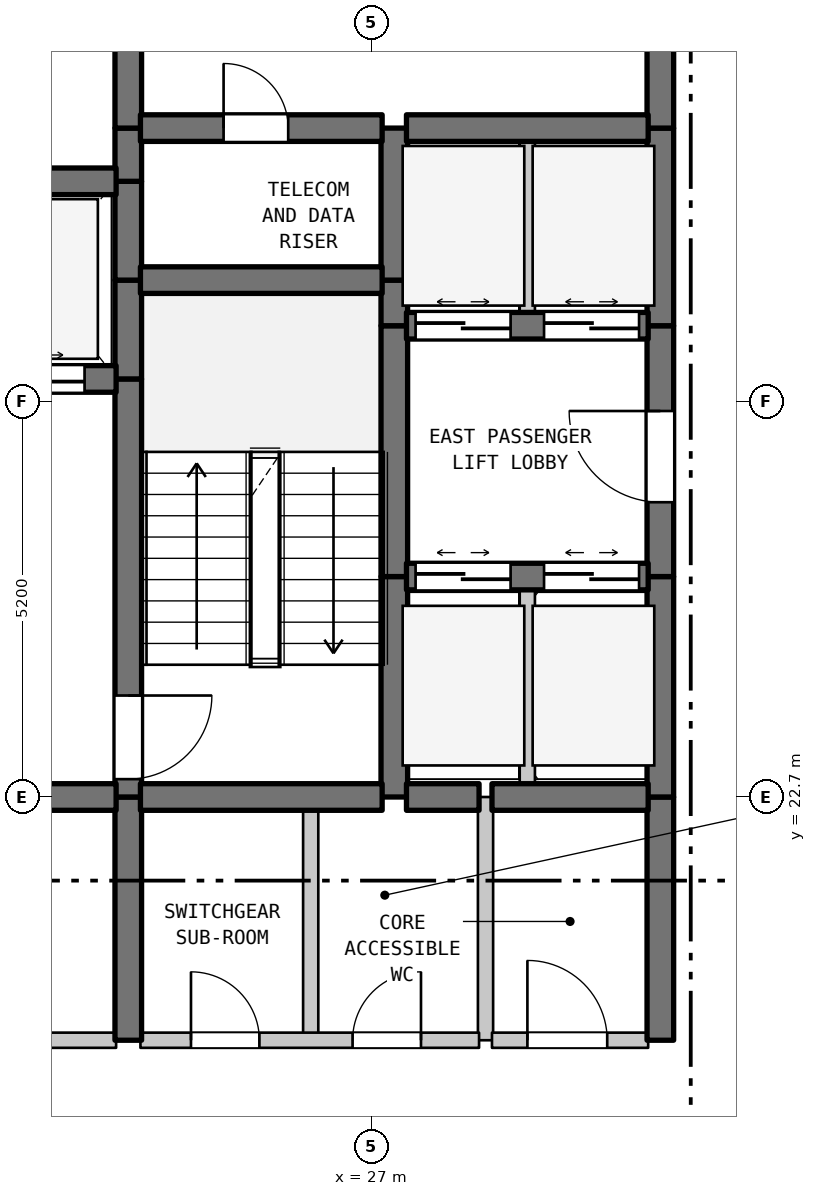
"""IFC4 building model, lengths in metres.
Left out: names, types, materials, properties, quantities, classifications, styles, units other than length and angle.
Written with IfcOpenShell. Run it as: python <this file> out.ifc"""

import sys

from ifc_helpers import new_model, si_unit, direction, frame, frame_2d, origin, place, context, subcontext, project, spatial, rectangle, extrude, element, fill, save


model = new_model("IFC4")
c1 = context("Model", 3, precision=1e-05, world=origin(), true_north=direction((0.0, 1.0)))
c2 = subcontext(c1, "Body", "Model", "MODEL_VIEW")
j1 = project(units=[si_unit("LENGTHUNIT", "METRE"), si_unit("PLANEANGLEUNIT", "RADIAN")], contexts=[c1])
p1 = place(None, origin())
s1 = spatial("IfcSite", under=j1, at=p1, CompositionType="ELEMENT")
p2 = place(p1, origin())
s2 = spatial("IfcBuilding", under=s1, at=p2, CompositionType="ELEMENT")
p3 = place(p2, frame((0.0, 0.0, 172.8)))
s3 = spatial("IfcBuildingStorey", under=s2, at=p3, CompositionType="ELEMENT", Elevation=172.8)
p4 = place(p3, frame((23.8, 19.5, 0.0), z_axis=(0.0, 0.0, 1.0), x_axis=(0.0, 1.0, 0.0)))
e1 = element("IfcWall", 1, at=p4, inside=s3, PredefinedType="SHEAR", context=c2, shape_type="SweptSolid", body=[
    extrude(rectangle(XDim=3.2, YDim=0.35, at=frame_2d((1.6, 0.0))), origin(), (0.0, 0.0, 1.0), 3.39),
])
p5 = place(p3, frame((23.8, 22.7, 0.0), z_axis=(0.0, 0.0, 1.0), x_axis=(0.0, 1.0, 0.0)))
e2 = element("IfcWall", 2, at=p5, inside=s3, PredefinedType="SHEAR", context=c2, shape_type="SweptSolid", body=[
    extrude(rectangle(XDim=5.5, YDim=0.35, at=frame_2d((2.75, 0.0))), origin(), (0.0, 0.0, 1.0), 3.39),
])
p6 = place(p5, frame((0.235, 0.0, 0.0)))
e3 = element("IfcOpeningElement", 3, at=p6, cuts=e2, PredefinedType="OPENING", context=c2, shape_type="SweptSolid", body=[
    extrude(rectangle(XDim=1.1, YDim=2.15, at=frame_2d((0.55, 1.075))), frame((0.0, 0.185, 0.0), z_axis=(0.0, -1.0, 0.0), x_axis=(1.0, 0.0, 0.0)), (0.0, 0.0, 1.0), 0.37),
])
for number, where, z_axis, x_axis in (
    (4, (23.8, 28.2, 0.0), (0.0, 0.0, 1.0), (0.0, 1.0, 0.0)),
    (5, (23.8, 29.5, 0.0), (0.0, 0.0, 1.0), (0.0, 1.0, 0.0)),
):
    element("IfcWall", number, at=place(p3, frame(where, z_axis=z_axis, x_axis=x_axis)), inside=s3, PredefinedType="SHEAR", context=c2, shape_type="SweptSolid", body=[
        extrude(rectangle(XDim=1.3, YDim=0.35, at=frame_2d((0.65, 0.0))), origin(), (0.0, 0.0, 1.0), 3.39),
    ])
p7 = place(p3, frame((23.8, 30.8, 0.0), z_axis=(0.0, 0.0, 1.0), x_axis=(0.0, 1.0, 0.0)))
e6 = element("IfcWall", 6, at=p7, inside=s3, PredefinedType="SHEAR", context=c2, shape_type="SweptSolid", body=[
    extrude(rectangle(XDim=0.7, YDim=0.35, at=frame_2d((0.35, 0.0))), origin(), (0.0, 0.0, 1.0), 3.39),
])
p8 = place(p3, frame((23.8, 31.5, 0.0), z_axis=(0.0, 0.0, 1.0), x_axis=(0.0, 1.0, 0.0)))
e7 = element("IfcWall", 7, at=p8, inside=s3, PredefinedType="SHEAR", context=c2, shape_type="SweptSolid", body=[
    extrude(rectangle(XDim=3.5, YDim=0.35, at=frame_2d((1.75, 0.0))), origin(), (0.0, 0.0, 1.0), 3.39),
])
p9 = place(p8, frame((1.127, 0.0, 0.0)))
e8 = element("IfcOpeningElement", 8, at=p9, cuts=e7, PredefinedType="OPENING", context=c2, shape_type="SweptSolid", body=[
    extrude(rectangle(XDim=1.1, YDim=2.15, at=frame_2d((0.55, 1.075))), frame((0.0, 0.185, 0.0), z_axis=(0.0, -1.0, 0.0), x_axis=(1.0, 0.0, 0.0)), (0.0, 0.0, 1.0), 0.37),
])
p10 = place(p3, frame((26.2, 19.5, 0.0), z_axis=(0.0, 0.0, 1.0), x_axis=(0.0, 1.0, 0.0)))
e9 = element("IfcWall", 9, at=p10, inside=s3, PredefinedType="STANDARD", context=c2, shape_type="SweptSolid", body=[
    extrude(rectangle(XDim=3.2, YDim=0.2, at=frame_2d((1.6, 0.0))), origin(), (0.0, 0.0, 1.0), 3.39),
])
p11 = place(p3, frame((27.3, 22.7, 0.0), z_axis=(0.0, 0.0, 1.0), x_axis=(0.0, 1.0, 0.0)))
e10 = element("IfcWall", 10, at=p11, inside=s3, PredefinedType="SHEAR", context=c2, shape_type="SweptSolid", body=[
    extrude(rectangle(XDim=2.9, YDim=0.35, at=frame_2d((1.45, 0.0))), origin(), (0.0, 0.0, 1.0), 3.39),
])
p12 = place(p3, frame((27.3, 25.6, 0.0), z_axis=(0.0, 0.0, 1.0), x_axis=(0.0, 1.0, 0.0)))
e11 = element("IfcWall", 11, at=p12, inside=s3, PredefinedType="SHEAR", context=c2, shape_type="SweptSolid", body=[
    extrude(rectangle(XDim=3.3, YDim=0.35, at=frame_2d((1.65, 0.0))), origin(), (0.0, 0.0, 1.0), 3.39),
])
p13 = place(p3, frame((27.3, 28.9, 0.0), z_axis=(0.0, 0.0, 1.0), x_axis=(0.0, 1.0, 0.0)))
e12 = element("IfcWall", 12, at=p13, inside=s3, PredefinedType="SHEAR", context=c2, shape_type="SweptSolid", body=[
    extrude(rectangle(XDim=0.6, YDim=0.35, at=frame_2d((0.3, 0.0))), origin(), (0.0, 0.0, 1.0), 3.39),
])
p14 = place(p3, frame((27.3, 29.5, 0.0), z_axis=(0.0, 0.0, 1.0), x_axis=(0.0, 1.0, 0.0)))
e13 = element("IfcWall", 13, at=p14, inside=s3, PredefinedType="SHEAR", context=c2, shape_type="SweptSolid", body=[
    extrude(rectangle(XDim=2.0, YDim=0.35, at=frame_2d((1.0, 0.0))), origin(), (0.0, 0.0, 1.0), 3.39),
])
p15 = place(p3, frame((28.5, 19.5, 0.0), z_axis=(0.0, 0.0, 1.0), x_axis=(0.0, 1.0, 0.0)))
e14 = element("IfcWall", 14, at=p15, inside=s3, PredefinedType="STANDARD", context=c2, shape_type="SweptSolid", body=[
    extrude(rectangle(XDim=3.2, YDim=0.2, at=frame_2d((1.6, 0.0))), origin(), (0.0, 0.0, 1.0), 3.39),
])
p16 = place(p3, frame((29.05, 22.7, 0.0), z_axis=(0.0, 0.0, 1.0), x_axis=(0.0, 1.0, 0.0)))
e15 = element("IfcWall", 15, at=p16, inside=s3, PredefinedType="STANDARD", context=c2, shape_type="SweptSolid", body=[
    extrude(rectangle(XDim=2.9, YDim=0.2, at=frame_2d((1.45, 0.0))), origin(), (0.0, 0.0, 1.0), 3.39),
])
p17 = place(p3, frame((29.05, 28.9, 0.0), z_axis=(0.0, 0.0, 1.0), x_axis=(0.0, 1.0, 0.0)))
e16 = element("IfcWall", 16, at=p17, inside=s3, PredefinedType="STANDARD", context=c2, shape_type="SweptSolid", body=[
    extrude(rectangle(XDim=2.6, YDim=0.2, at=frame_2d((1.3, 0.0))), origin(), (0.0, 0.0, 1.0), 3.39),
])
p18 = place(p3, frame((30.8, 19.5, 0.0), z_axis=(0.0, 0.0, 1.0), x_axis=(0.0, 1.0, 0.0)))
e17 = element("IfcWall", 17, at=p18, inside=s3, PredefinedType="SHEAR", context=c2, shape_type="SweptSolid", body=[
    extrude(rectangle(XDim=3.2, YDim=0.35, at=frame_2d((1.6, 0.0))), origin(), (0.0, 0.0, 1.0), 3.39),
])
p19 = place(p3, frame((30.8, 22.7, 0.0), z_axis=(0.0, 0.0, 1.0), x_axis=(0.0, 1.0, 0.0)))
e18 = element("IfcWall", 18, at=p19, inside=s3, PredefinedType="SHEAR", context=c2, shape_type="SweptSolid", body=[
    extrude(rectangle(XDim=2.9, YDim=0.35, at=frame_2d((1.45, 0.0))), origin(), (0.0, 0.0, 1.0), 3.39),
])
p20 = place(p3, frame((30.8, 25.6, 0.0), z_axis=(0.0, 0.0, 1.0), x_axis=(0.0, 1.0, 0.0)))
e19 = element("IfcWall", 19, at=p20, inside=s3, PredefinedType="SHEAR", context=c2, shape_type="SweptSolid", body=[
    extrude(rectangle(XDim=3.3, YDim=0.35, at=frame_2d((1.65, 0.0))), origin(), (0.0, 0.0, 1.0), 3.39),
])
p21 = place(p20, frame((0.978, 0.0, 0.0)))
e20 = element("IfcOpeningElement", 20, at=p21, cuts=e19, PredefinedType="OPENING", context=c2, shape_type="SweptSolid", body=[
    extrude(rectangle(XDim=1.2, YDim=2.2, at=frame_2d((0.6, 1.1))), frame((0.0, 0.185, 0.0), z_axis=(0.0, -1.0, 0.0), x_axis=(1.0, 0.0, 0.0)), (0.0, 0.0, 1.0), 0.37),
])
p22 = place(p3, frame((30.8, 28.9, 0.0), z_axis=(0.0, 0.0, 1.0), x_axis=(0.0, 1.0, 0.0)))
e21 = element("IfcWall", 21, at=p22, inside=s3, PredefinedType="SHEAR", context=c2, shape_type="SweptSolid", body=[
    extrude(rectangle(XDim=2.6, YDim=0.35, at=frame_2d((1.3, 0.0))), origin(), (0.0, 0.0, 1.0), 3.39),
])
p23 = place(p3, frame((30.8, 31.5, 0.0), z_axis=(0.0, 0.0, 1.0), x_axis=(0.0, 1.0, 0.0)))
e22 = element("IfcWall", 22, at=p23, inside=s3, PredefinedType="SHEAR", context=c2, shape_type="SweptSolid", body=[
    extrude(rectangle(XDim=3.5, YDim=0.35, at=frame_2d((1.75, 0.0))), origin(), (0.0, 0.0, 1.0), 3.39),
])
p24 = place(p23, frame((1.15, 0.0, 0.0)))
e23 = element("IfcOpeningElement", 23, at=p24, cuts=e22, PredefinedType="OPENING", context=c2, shape_type="SweptSolid", body=[
    extrude(rectangle(XDim=1.2, YDim=2.2, at=frame_2d((0.6, 1.1))), frame((0.0, 0.185, 0.0), z_axis=(0.0, -1.0, 0.0), x_axis=(1.0, 0.0, 0.0)), (0.0, 0.0, 1.0), 0.37),
])
p25 = place(p3, frame((19.16, 19.5, 0.0), z_axis=(0.0, 0.0, 1.0), x_axis=(1.0, 0.0, 0.0)))
e24 = element("IfcWall", 24, at=p25, inside=s3, PredefinedType="STANDARD", context=c2, shape_type="SweptSolid", body=[
    extrude(rectangle(XDim=4.48, YDim=0.2, at=frame_2d((2.24, 0.0))), origin(), (0.0, 0.0, 1.0), 3.39),
])
p26 = place(p25, frame((1.64, 0.0, 0.0)))
e25 = element("IfcOpeningElement", 25, at=p26, cuts=e24, PredefinedType="OPENING", context=c2, shape_type="SweptSolid", body=[
    extrude(rectangle(XDim=1.2, YDim=2.2, at=frame_2d((0.6, 1.1))), frame((0.0, 0.11, 0.0), z_axis=(0.0, -1.0, 0.0), x_axis=(1.0, 0.0, 0.0)), (0.0, 0.0, 1.0), 0.22),
])
p27 = place(p3, frame((23.96, 19.5, 0.0), z_axis=(0.0, 0.0, 1.0), x_axis=(1.0, 0.0, 0.0)))
e26 = element("IfcWall", 26, at=p27, inside=s3, PredefinedType="STANDARD", context=c2, shape_type="SweptSolid", body=[
    extrude(rectangle(XDim=4.455, YDim=0.2, at=frame_2d((2.228, 0.0))), origin(), (0.0, 0.0, 1.0), 3.39),
])
p28 = place(p27, frame((0.665, 0.0, 0.0)))
e27 = element("IfcOpeningElement", 27, at=p28, cuts=e26, PredefinedType="OPENING", context=c2, shape_type="SweptSolid", body=[
    extrude(rectangle(XDim=0.9, YDim=2.15, at=frame_2d((0.45, 1.075))), frame((0.0, 0.11, 0.0), z_axis=(0.0, -1.0, 0.0), x_axis=(1.0, 0.0, 0.0)), (0.0, 0.0, 1.0), 0.22),
])
p29 = place(p27, frame((2.791, 0.0, 0.0)))
e28 = element("IfcOpeningElement", 28, at=p29, cuts=e26, PredefinedType="OPENING", context=c2, shape_type="SweptSolid", body=[
    extrude(rectangle(XDim=0.9, YDim=2.15, at=frame_2d((0.45, 1.075))), frame((0.0, 0.11, 0.0), z_axis=(0.0, -1.0, 0.0), x_axis=(1.0, 0.0, 0.0)), (0.0, 0.0, 1.0), 0.22),
])
p30 = place(p3, frame((28.585, 19.5, 0.0), z_axis=(0.0, 0.0, 1.0), x_axis=(1.0, 0.0, 0.0)))
e29 = element("IfcWall", 29, at=p30, inside=s3, PredefinedType="STANDARD", context=c2, shape_type="SweptSolid", body=[
    extrude(rectangle(XDim=2.055, YDim=0.2, at=frame_2d((1.027, 0.0))), origin(), (0.0, 0.0, 1.0), 3.39),
])
p31 = place(p30, frame((0.466, 0.0, 0.0)))
e30 = element("IfcOpeningElement", 30, at=p31, cuts=e29, PredefinedType="OPENING", context=c2, shape_type="SweptSolid", body=[
    extrude(rectangle(XDim=1.05, YDim=2.15, at=frame_2d((0.525, 1.075))), frame((0.0, 0.11, 0.0), z_axis=(0.0, -1.0, 0.0), x_axis=(1.0, 0.0, 0.0)), (0.0, 0.0, 1.0), 0.22),
])
p32 = place(p3, frame((19.16, 22.7, 0.0), z_axis=(0.0, 0.0, 1.0), x_axis=(1.0, 0.0, 0.0)))
e31 = element("IfcWall", 31, at=p32, inside=s3, PredefinedType="SHEAR", context=c2, shape_type="SweptSolid", body=[
    extrude(rectangle(XDim=4.48, YDim=0.35, at=frame_2d((2.24, 0.0))), origin(), (0.0, 0.0, 1.0), 3.39),
])
p33 = place(p32, frame((1.64, 0.0, 0.0)))
e32 = element("IfcOpeningElement", 32, at=p33, cuts=e31, PredefinedType="OPENING", context=c2, shape_type="SweptSolid", body=[
    extrude(rectangle(XDim=1.2, YDim=2.2, at=frame_2d((0.6, 1.1))), frame((0.0, 0.185, 0.0), z_axis=(0.0, -1.0, 0.0), x_axis=(1.0, 0.0, 0.0)), (0.0, 0.0, 1.0), 0.37),
])
p34 = place(p3, frame((23.96, 22.7, 0.0), z_axis=(0.0, 0.0, 1.0), x_axis=(1.0, 0.0, 0.0)))
e33 = element("IfcWall", 33, at=p34, inside=s3, PredefinedType="SHEAR", context=c2, shape_type="SweptSolid", body=[
    extrude(rectangle(XDim=3.18, YDim=0.35, at=frame_2d((1.59, 0.0))), origin(), (0.0, 0.0, 1.0), 3.39),
])
p35 = place(p3, frame((27.46, 22.7, 0.0), z_axis=(0.0, 0.0, 1.0), x_axis=(1.0, 0.0, 0.0)))
e34 = element("IfcWall", 34, at=p35, inside=s3, PredefinedType="SHEAR", context=c2, shape_type="SweptSolid", body=[
    extrude(rectangle(XDim=0.955, YDim=0.35, at=frame_2d((0.478, 0.0))), origin(), (0.0, 0.0, 1.0), 3.39),
])
p36 = place(p3, frame((28.585, 22.7, 0.0), z_axis=(0.0, 0.0, 1.0), x_axis=(1.0, 0.0, 0.0)))
e35 = element("IfcWall", 35, at=p36, inside=s3, PredefinedType="SHEAR", context=c2, shape_type="SweptSolid", body=[
    extrude(rectangle(XDim=2.055, YDim=0.35, at=frame_2d((1.027, 0.0))), origin(), (0.0, 0.0, 1.0), 3.39),
])
p37 = place(p3, frame((27.46, 25.6, 0.0), z_axis=(0.0, 0.0, 1.0), x_axis=(1.0, 0.0, 0.0)))
e36 = element("IfcWall", 36, at=p37, inside=s3, PredefinedType="SHEAR", context=c2, shape_type="SweptSolid", body=[
    extrude(rectangle(XDim=3.18, YDim=0.35, at=frame_2d((1.59, 0.0))), origin(), (0.0, 0.0, 1.0), 3.39),
])
p38 = place(p37, frame((0.12, 0.0, 0.0)))
e37 = element("IfcOpeningElement", 37, at=p38, cuts=e36, PredefinedType="OPENING", context=c2, shape_type="SweptSolid", body=[
    extrude(rectangle(XDim=1.25, YDim=2.2, at=frame_2d((0.625, 1.1))), frame((0.0, 0.185, 0.0), z_axis=(0.0, -1.0, 0.0), x_axis=(1.0, 0.0, 0.0)), (0.0, 0.0, 1.0), 0.37),
])
p39 = place(p37, frame((1.81, 0.0, 0.0)))
e38 = element("IfcOpeningElement", 38, at=p39, cuts=e36, PredefinedType="OPENING", context=c2, shape_type="SweptSolid", body=[
    extrude(rectangle(XDim=1.25, YDim=2.2, at=frame_2d((0.625, 1.1))), frame((0.0, 0.185, 0.0), z_axis=(0.0, -1.0, 0.0), x_axis=(1.0, 0.0, 0.0)), (0.0, 0.0, 1.0), 0.37),
])
p40 = place(p3, frame((19.16, 28.2, 0.0), z_axis=(0.0, 0.0, 1.0), x_axis=(1.0, 0.0, 0.0)))
e39 = element("IfcWall", 39, at=p40, inside=s3, PredefinedType="SHEAR", context=c2, shape_type="SweptSolid", body=[
    extrude(rectangle(XDim=4.48, YDim=0.35, at=frame_2d((2.24, 0.0))), origin(), (0.0, 0.0, 1.0), 3.39),
])
p41 = place(p40, frame((0.415, 0.0, 0.0)))
e40 = element("IfcOpeningElement", 40, at=p41, cuts=e39, PredefinedType="OPENING", context=c2, shape_type="SweptSolid", body=[
    extrude(rectangle(XDim=1.25, YDim=2.2, at=frame_2d((0.625, 1.1))), frame((0.0, 0.185, 0.0), z_axis=(0.0, -1.0, 0.0), x_axis=(1.0, 0.0, 0.0)), (0.0, 0.0, 1.0), 0.37),
])
p42 = place(p40, frame((2.815, 0.0, 0.0)))
e41 = element("IfcOpeningElement", 41, at=p42, cuts=e39, PredefinedType="OPENING", context=c2, shape_type="SweptSolid", body=[
    extrude(rectangle(XDim=1.25, YDim=2.2, at=frame_2d((0.625, 1.1))), frame((0.0, 0.185, 0.0), z_axis=(0.0, -1.0, 0.0), x_axis=(1.0, 0.0, 0.0)), (0.0, 0.0, 1.0), 0.37),
])
p43 = place(p3, frame((27.46, 28.9, 0.0), z_axis=(0.0, 0.0, 1.0), x_axis=(1.0, 0.0, 0.0)))
e42 = element("IfcWall", 42, at=p43, inside=s3, PredefinedType="SHEAR", context=c2, shape_type="SweptSolid", body=[
    extrude(rectangle(XDim=3.18, YDim=0.35, at=frame_2d((1.59, 0.0))), origin(), (0.0, 0.0, 1.0), 3.39),
])
p44 = place(p43, frame((0.12, 0.0, 0.0)))
e43 = element("IfcOpeningElement", 43, at=p44, cuts=e42, PredefinedType="OPENING", context=c2, shape_type="SweptSolid", body=[
    extrude(rectangle(XDim=1.25, YDim=2.2, at=frame_2d((0.625, 1.1))), frame((0.0, 0.185, 0.0), z_axis=(0.0, -1.0, 0.0), x_axis=(1.0, 0.0, 0.0)), (0.0, 0.0, 1.0), 0.37),
])
p45 = place(p43, frame((1.81, 0.0, 0.0)))
e44 = element("IfcOpeningElement", 44, at=p45, cuts=e42, PredefinedType="OPENING", context=c2, shape_type="SweptSolid", body=[
    extrude(rectangle(XDim=1.25, YDim=2.2, at=frame_2d((0.625, 1.1))), frame((0.0, 0.185, 0.0), z_axis=(0.0, -1.0, 0.0), x_axis=(1.0, 0.0, 0.0)), (0.0, 0.0, 1.0), 0.37),
])
p46 = place(p3, frame((23.96, 29.5, 0.0), z_axis=(0.0, 0.0, 1.0), x_axis=(1.0, 0.0, 0.0)))
e45 = element("IfcWall", 45, at=p46, inside=s3, PredefinedType="SHEAR", context=c2, shape_type="SweptSolid", body=[
    extrude(rectangle(XDim=3.18, YDim=0.35, at=frame_2d((1.59, 0.0))), origin(), (0.0, 0.0, 1.0), 3.39),
])
p47 = place(p3, frame((19.16, 30.8, 0.0), z_axis=(0.0, 0.0, 1.0), x_axis=(1.0, 0.0, 0.0)))
e46 = element("IfcWall", 46, at=p47, inside=s3, PredefinedType="SHEAR", context=c2, shape_type="SweptSolid", body=[
    extrude(rectangle(XDim=4.48, YDim=0.35, at=frame_2d((2.24, 0.0))), origin(), (0.0, 0.0, 1.0), 3.39),
])
p48 = place(p3, frame((23.96, 31.5, 0.0), z_axis=(0.0, 0.0, 1.0), x_axis=(1.0, 0.0, 0.0)))
e47 = element("IfcWall", 47, at=p48, inside=s3, PredefinedType="SHEAR", context=c2, shape_type="SweptSolid", body=[
    extrude(rectangle(XDim=3.18, YDim=0.35, at=frame_2d((1.59, 0.0))), origin(), (0.0, 0.0, 1.0), 3.39),
])
p49 = place(p48, frame((1.094, 0.0, 0.0)))
e48 = element("IfcOpeningElement", 48, at=p49, cuts=e47, PredefinedType="OPENING", context=c2, shape_type="SweptSolid", body=[
    extrude(rectangle(XDim=0.85, YDim=2.1, at=frame_2d((0.425, 1.05))), frame((0.0, 0.185, 0.0), z_axis=(0.0, -1.0, 0.0), x_axis=(1.0, 0.0, 0.0)), (0.0, 0.0, 1.0), 0.37),
])
p50 = place(p3, frame((27.46, 31.5, 0.0), z_axis=(0.0, 0.0, 1.0), x_axis=(1.0, 0.0, 0.0)))
e49 = element("IfcWall", 49, at=p50, inside=s3, PredefinedType="SHEAR", context=c2, shape_type="SweptSolid", body=[
    extrude(rectangle(XDim=3.18, YDim=0.35, at=frame_2d((1.59, 0.0))), origin(), (0.0, 0.0, 1.0), 3.39),
])
p51 = place(p6, frame((1.1, 0.0, 0.0), z_axis=(0.0, 0.0, 1.0), x_axis=(-1.0, 0.0, 0.0)))
e50 = element("IfcDoor", 50, at=p51, inside=s3, OperationType="SINGLE_SWING_RIGHT", PredefinedType="DOOR", context=c2, shape_type="SweptSolid", body=[
    extrude(rectangle(XDim=1.1, YDim=2.15, at=frame_2d((0.55, 1.075))), frame((0.0, 0.025, 0.0), z_axis=(0.0, -1.0, 0.0), x_axis=(1.0, 0.0, 0.0)), (0.0, 0.0, 1.0), 0.05),
])
fill(e3, e50)
p52 = place(p21, origin())
e51 = element("IfcDoor", 51, at=p52, inside=s3, OperationType="SINGLE_SWING_RIGHT", PredefinedType="DOOR", context=c2, shape_type="SweptSolid", body=[
    extrude(rectangle(XDim=1.2, YDim=2.2, at=frame_2d((0.6, 1.1))), frame((0.0, 0.025, 0.0), z_axis=(0.0, -1.0, 0.0), x_axis=(1.0, 0.0, 0.0)), (0.0, 0.0, 1.0), 0.05),
])
fill(e20, e51)
p53 = place(p28, origin())
e52 = element("IfcDoor", 52, at=p53, inside=s3, OperationType="SINGLE_SWING_LEFT", PredefinedType="DOOR", context=c2, shape_type="SweptSolid", body=[
    extrude(rectangle(XDim=0.9, YDim=2.15, at=frame_2d((0.45, 1.075))), frame((0.0, 0.025, 0.0), z_axis=(0.0, -1.0, 0.0), x_axis=(1.0, 0.0, 0.0)), (0.0, 0.0, 1.0), 0.05),
])
fill(e27, e52)
p54 = place(p29, origin())
e53 = element("IfcDoor", 53, at=p54, inside=s3, OperationType="SINGLE_SWING_RIGHT", PredefinedType="DOOR", context=c2, shape_type="SweptSolid", body=[
    extrude(rectangle(XDim=0.9, YDim=2.15, at=frame_2d((0.45, 1.075))), frame((0.0, 0.025, 0.0), z_axis=(0.0, -1.0, 0.0), x_axis=(1.0, 0.0, 0.0)), (0.0, 0.0, 1.0), 0.05),
])
fill(e28, e53)
p55 = place(p31, origin())
e54 = element("IfcDoor", 54, at=p55, inside=s3, OperationType="SINGLE_SWING_LEFT", PredefinedType="DOOR", context=c2, shape_type="SweptSolid", body=[
    extrude(rectangle(XDim=1.05, YDim=2.15, at=frame_2d((0.525, 1.075))), frame((0.0, 0.025, 0.0), z_axis=(0.0, -1.0, 0.0), x_axis=(1.0, 0.0, 0.0)), (0.0, 0.0, 1.0), 0.05),
])
fill(e30, e54)
p56 = place(p38, origin())
e55 = element("IfcDoor", 55, at=p56, inside=s3, OperationType="DOUBLE_DOOR_SLIDING", PredefinedType="DOOR", context=c2, shape_type="SweptSolid", body=[
    extrude(rectangle(XDim=1.25, YDim=2.2, at=frame_2d((0.625, 1.1))), frame((0.0, 0.025, 0.0), z_axis=(0.0, -1.0, 0.0), x_axis=(1.0, 0.0, 0.0)), (0.0, 0.0, 1.0), 0.05),
])
fill(e37, e55)
p57 = place(p39, origin())
e56 = element("IfcDoor", 56, at=p57, inside=s3, OperationType="DOUBLE_DOOR_SLIDING", PredefinedType="DOOR", context=c2, shape_type="SweptSolid", body=[
    extrude(rectangle(XDim=1.25, YDim=2.2, at=frame_2d((0.625, 1.1))), frame((0.0, 0.025, 0.0), z_axis=(0.0, -1.0, 0.0), x_axis=(1.0, 0.0, 0.0)), (0.0, 0.0, 1.0), 0.05),
])
fill(e38, e56)
p58 = place(p42, origin())
e57 = element("IfcDoor", 57, at=p58, inside=s3, OperationType="DOUBLE_DOOR_SLIDING", PredefinedType="DOOR", context=c2, shape_type="SweptSolid", body=[
    extrude(rectangle(XDim=1.25, YDim=2.2, at=frame_2d((0.625, 1.1))), frame((0.0, 0.025, 0.0), z_axis=(0.0, -1.0, 0.0), x_axis=(1.0, 0.0, 0.0)), (0.0, 0.0, 1.0), 0.05),
])
fill(e41, e57)
p59 = place(p44, origin())
e58 = element("IfcDoor", 58, at=p59, inside=s3, OperationType="DOUBLE_DOOR_SLIDING", PredefinedType="DOOR", context=c2, shape_type="SweptSolid", body=[
    extrude(rectangle(XDim=1.25, YDim=2.2, at=frame_2d((0.625, 1.1))), frame((0.0, 0.025, 0.0), z_axis=(0.0, -1.0, 0.0), x_axis=(1.0, 0.0, 0.0)), (0.0, 0.0, 1.0), 0.05),
])
fill(e43, e58)
p60 = place(p45, origin())
e59 = element("IfcDoor", 59, at=p60, inside=s3, OperationType="DOUBLE_DOOR_SLIDING", PredefinedType="DOOR", context=c2, shape_type="SweptSolid", body=[
    extrude(rectangle(XDim=1.25, YDim=2.2, at=frame_2d((0.625, 1.1))), frame((0.0, 0.025, 0.0), z_axis=(0.0, -1.0, 0.0), x_axis=(1.0, 0.0, 0.0)), (0.0, 0.0, 1.0), 0.05),
])
fill(e44, e59)
p61 = place(p49, origin())
e60 = element("IfcDoor", 60, at=p61, inside=s3, OperationType="SINGLE_SWING_LEFT", PredefinedType="DOOR", context=c2, shape_type="SweptSolid", body=[
    extrude(rectangle(XDim=0.85, YDim=2.1, at=frame_2d((0.425, 1.05))), frame((0.0, 0.025, 0.0), z_axis=(0.0, -1.0, 0.0), x_axis=(1.0, 0.0, 0.0)), (0.0, 0.0, 1.0), 0.05),
])
fill(e48, e60)
save(model, sys.argv[1])
